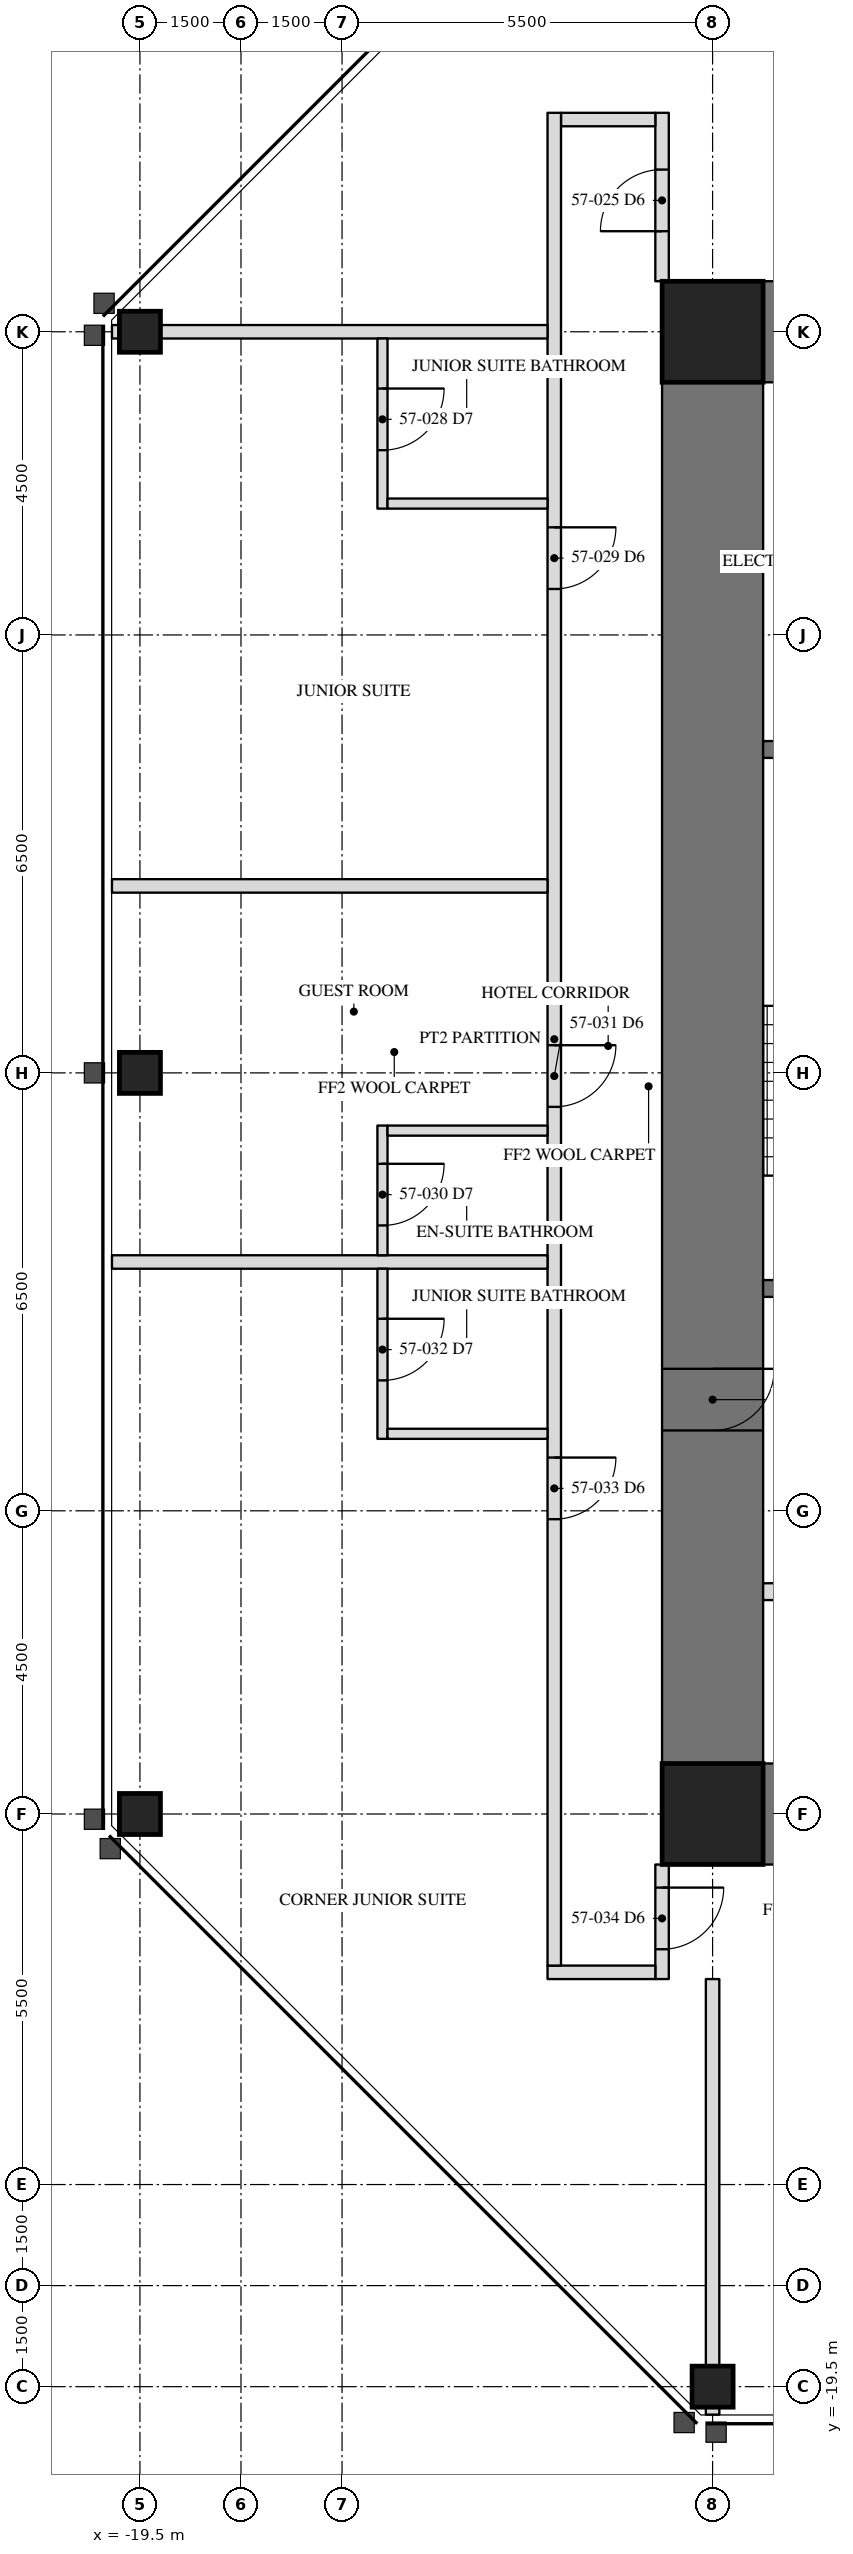
"""IFC4 building model, lengths in metres.
Left out: names, types, materials, properties, quantities, classifications, styles, units other than length and angle.
Written with IfcOpenShell. Run it as: python <this file> out.ifc"""

import sys

from ifc_helpers import new_model, si_unit, direction, frame, frame_2d, origin, origin_2d, place, context, subcontext, project, spatial, rectangle, hollow_rectangle, extrude, element, fill, save


model = new_model("IFC4")
c1 = context("Model", 3, precision=1e-05, world=origin(), true_north=direction((0.0, 1.0)))
c2 = subcontext(c1, "Body", "Model", "MODEL_VIEW")
j1 = project(units=[si_unit("LENGTHUNIT", "METRE"), si_unit("PLANEANGLEUNIT", "RADIAN")], contexts=[c1])
p1 = place(None, origin())
s1 = spatial("IfcSite", under=j1, at=p1, CompositionType="ELEMENT")
p2 = place(p1, origin())
s2 = spatial("IfcBuilding", under=s1, at=p2, CompositionType="ELEMENT")
p3 = place(p2, frame((0.0, 0.0, 236.2)))
s3 = spatial("IfcBuildingStorey", under=s2, at=p3, CompositionType="ELEMENT", Elevation=236.2)
for number, where, z_axis, x_axis in (
    (1, (-19.5, 0.0, 0.0), (0.0, 0.0, 1.0), (0.0, 1.0, 0.0)),
    (2, (-19.5, -11.0, 0.0), (0.0, 0.0, 1.0), (0.0, 1.0, 0.0)),
    (3, (-11.0, -19.5, 0.0), (0.0, 0.0, 1.0), (1.0, 0.0, 0.0)),
    (4, (-19.5, 11.0, 0.0), (0.0, 0.0, 1.0), (0.0, 1.0, 0.0)),
):
    element("IfcColumn", number, at=place(p3, frame(where, z_axis=z_axis, x_axis=x_axis)), inside=s3, PredefinedType="COLUMN", context=c2, shape_type="SweptSolid", body=[
        extrude(hollow_rectangle(XDim=0.61, YDim=0.61, WallThickness=0.051, at=origin_2d()), origin(), (0.0, 0.0, 1.0), 3.5),
    ])
p4 = place(p3, frame((-11.0, 11.0, 0.0), z_axis=(0.0, 0.0, 1.0), x_axis=(0.0, -1.0, 0.0)))
e5 = element("IfcWall", 5, at=p4, inside=s3, PredefinedType="SHEAR", context=c2, shape_type="SweptSolid", body=[
    extrude(rectangle(XDim=22.0, YDim=1.5, at=frame_2d((11.0, 0.0))), origin(), (0.0, 0.0, 1.0), 3.5),
])
p5 = place(p4, frame((15.393, 0.0, 0.0)))
e6 = element("IfcOpeningElement", 6, at=p5, cuts=e5, PredefinedType="OPENING", context=c2, shape_type="SweptSolid", body=[
    extrude(rectangle(XDim=0.915, YDim=2.134, at=frame_2d((0.458, 1.067))), frame((0.0, 0.76, 0.0), z_axis=(0.0, -1.0, 0.0), x_axis=(1.0, 0.0, 0.0)), (0.0, 0.0, 1.0), 1.52),
])
for number, where, z_axis, x_axis in (
    (7, (-6.5, 11.0, 0.0), (0.0, 0.0, 1.0), (-1.0, 0.0, 0.0)),
    (8, (-11.0, -11.0, 0.0), (0.0, 0.0, 1.0), (1.0, 0.0, 0.0)),
):
    element("IfcWall", number, at=place(p3, frame(where, z_axis=z_axis, x_axis=x_axis)), inside=s3, PredefinedType="SHEAR", context=c2, shape_type="SweptSolid", body=[
        extrude(rectangle(XDim=4.5, YDim=1.5, at=frame_2d((2.25, 0.0))), origin(), (0.0, 0.0, 1.0), 3.5),
    ])
for number, where, z_axis, x_axis in (
    (9, (-11.0, 11.0, 0.0), (0.0, 0.0, 1.0), (1.0, 0.0, 0.0)),
    (10, (-11.0, -11.0, 0.0), (0.0, 0.0, 1.0), (1.0, 0.0, 0.0)),
):
    element("IfcColumn", number, at=place(p3, frame(where, z_axis=z_axis, x_axis=x_axis)), inside=s3, PredefinedType="COLUMN", context=c2, shape_type="SweptSolid", body=[
        extrude(hollow_rectangle(XDim=1.499, YDim=1.499, WallThickness=0.102, at=origin_2d()), origin(), (0.0, 0.0, 1.0), 3.5),
    ])
p6 = place(p3, frame((-6.95, 4.8, 0.0), z_axis=(0.0, 0.0, 1.0), x_axis=(-1.0, 0.0, 0.0)))
e11 = element("IfcWall", 11, at=p6, inside=s3, PredefinedType="SOLIDWALL", context=c2, shape_type="SweptSolid", body=[
    extrude(rectangle(XDim=3.3, YDim=0.25, at=frame_2d((1.65, 0.0))), origin(), (0.0, 0.0, 1.0), 3.31),
])
p7 = place(p3, frame((-6.95, -3.2, 0.0), z_axis=(0.0, 0.0, 1.0), x_axis=(-1.0, 0.0, 0.0)))
e12 = element("IfcWall", 12, at=p7, inside=s3, PredefinedType="SOLIDWALL", context=c2, shape_type="SweptSolid", body=[
    extrude(rectangle(XDim=3.3, YDim=0.25, at=frame_2d((1.65, 0.0))), origin(), (0.0, 0.0, 1.0), 3.31),
])
p8 = place(p7, frame((1.116, 0.0, 0.0)))
e13 = element("IfcOpeningElement", 13, at=p8, cuts=e12, PredefinedType="OPENING", context=c2, shape_type="SweptSolid", body=[
    extrude(rectangle(XDim=1.067, YDim=2.134, at=frame_2d((0.533, 1.067))), frame((0.0, 0.135, 0.0), z_axis=(0.0, -1.0, 0.0), x_axis=(1.0, 0.0, 0.0)), (0.0, 0.0, 1.0), 0.27),
])
p9 = place(p3, frame((-6.95, -7.7, 0.0), z_axis=(0.0, 0.0, 1.0), x_axis=(-1.0, 0.0, 0.0)))
e14 = element("IfcWall", 14, at=p9, inside=s3, PredefinedType="PARTITIONING", context=c2, shape_type="SweptSolid", body=[
    extrude(rectangle(XDim=3.3, YDim=0.25, at=frame_2d((1.65, 0.0))), origin(), (0.0, 0.0, 1.0), 3.31),
])
p10 = place(p9, frame((0.45, 0.0, 0.0)))
e15 = element("IfcOpeningElement", 15, at=p10, cuts=e14, PredefinedType="OPENING", context=c2, shape_type="SweptSolid", body=[
    extrude(rectangle(XDim=1.219, YDim=2.134, at=frame_2d((0.609, 1.067))), frame((0.0, 0.135, 0.0), z_axis=(0.0, -1.0, 0.0), x_axis=(1.0, 0.0, 0.0)), (0.0, 0.0, 1.0), 0.27),
])
p11 = place(p3, frame((-11.75, 11.75, 0.0), z_axis=(0.0, 0.0, 1.0), x_axis=(0.0, 1.0, 0.0)))
e16 = element("IfcWall", 16, at=p11, inside=s3, PredefinedType="PARTITIONING", context=c2, shape_type="SweptSolid", body=[
    extrude(rectangle(XDim=2.5, YDim=0.2, at=frame_2d((1.25, 0.0))), origin(), (0.0, 0.0, 1.0), 3.31),
])
p12 = place(p11, frame((0.742, 0.0, 0.0)))
e17 = element("IfcOpeningElement", 17, at=p12, cuts=e16, PredefinedType="OPENING", context=c2, shape_type="SweptSolid", body=[
    extrude(rectangle(XDim=0.915, YDim=2.134, at=frame_2d((0.458, 1.067))), frame((0.0, 0.11, 0.0), z_axis=(0.0, -1.0, 0.0), x_axis=(1.0, 0.0, 0.0)), (0.0, 0.0, 1.0), 0.22),
])
p13 = place(p3, frame((-11.85, 14.15, 0.0), z_axis=(0.0, 0.0, 1.0), x_axis=(-1.0, 0.0, 0.0)))
e18 = element("IfcWall", 18, at=p13, inside=s3, PredefinedType="PARTITIONING", context=c2, shape_type="SweptSolid", body=[
    extrude(rectangle(XDim=1.4, YDim=0.2, at=frame_2d((0.7, 0.0))), origin(), (0.0, 0.0, 1.0), 3.31),
])
p14 = place(p3, frame((-11.75, -11.75, 0.0), z_axis=(0.0, 0.0, 1.0), x_axis=(0.0, -1.0, 0.0)))
e19 = element("IfcWall", 19, at=p14, inside=s3, PredefinedType="PARTITIONING", context=c2, shape_type="SweptSolid", body=[
    extrude(rectangle(XDim=1.7, YDim=0.2, at=frame_2d((0.85, 0.0))), origin(), (0.0, 0.0, 1.0), 3.31),
])
p15 = place(p14, frame((0.343, 0.0, 0.0)))
e20 = element("IfcOpeningElement", 20, at=p15, cuts=e19, PredefinedType="OPENING", context=c2, shape_type="SweptSolid", body=[
    extrude(rectangle(XDim=0.915, YDim=2.134, at=frame_2d((0.458, 1.067))), frame((0.0, 0.11, 0.0), z_axis=(0.0, -1.0, 0.0), x_axis=(1.0, 0.0, 0.0)), (0.0, 0.0, 1.0), 0.22),
])
p16 = place(p3, frame((-13.45, -13.35, 0.0), z_axis=(0.0, 0.0, 1.0), x_axis=(1.0, 0.0, 0.0)))
e21 = element("IfcWall", 21, at=p16, inside=s3, PredefinedType="PARTITIONING", context=c2, shape_type="SweptSolid", body=[
    extrude(rectangle(XDim=1.6, YDim=0.2, at=frame_2d((0.8, 0.0))), origin(), (0.0, 0.0, 1.0), 3.31),
])
p17 = place(p3, frame((-13.35, 14.25, 0.0), z_axis=(0.0, 0.0, 1.0), x_axis=(0.0, -1.0, 0.0)))
e22 = element("IfcWall", 22, at=p17, inside=s3, PredefinedType="PARTITIONING", context=c2, shape_type="SweptSolid", body=[
    extrude(rectangle(XDim=27.5, YDim=0.2, at=frame_2d((13.75, 0.0))), origin(), (0.0, 0.0, 1.0), 3.31),
])
p18 = place(p17, frame((6.153, 0.0, 0.0)))
e23 = element("IfcOpeningElement", 23, at=p18, cuts=e22, PredefinedType="OPENING", context=c2, shape_type="SweptSolid", body=[
    extrude(rectangle(XDim=0.915, YDim=2.134, at=frame_2d((0.458, 1.067))), frame((0.0, 0.11, 0.0), z_axis=(0.0, -1.0, 0.0), x_axis=(1.0, 0.0, 0.0)), (0.0, 0.0, 1.0), 0.22),
])
p19 = place(p17, frame((13.84, 0.0, 0.0)))
e24 = element("IfcOpeningElement", 24, at=p19, cuts=e22, PredefinedType="OPENING", context=c2, shape_type="SweptSolid", body=[
    extrude(rectangle(XDim=0.915, YDim=2.134, at=frame_2d((0.458, 1.067))), frame((0.0, 0.11, 0.0), z_axis=(0.0, -1.0, 0.0), x_axis=(1.0, 0.0, 0.0)), (0.0, 0.0, 1.0), 0.22),
])
p20 = place(p17, frame((19.959, 0.0, 0.0)))
e25 = element("IfcOpeningElement", 25, at=p20, cuts=e22, PredefinedType="OPENING", context=c2, shape_type="SweptSolid", body=[
    extrude(rectangle(XDim=0.915, YDim=2.134, at=frame_2d((0.458, 1.067))), frame((0.0, 0.11, 0.0), z_axis=(0.0, -1.0, 0.0), x_axis=(1.0, 0.0, 0.0)), (0.0, 0.0, 1.0), 0.22),
])
p21 = place(p3, frame((-13.45, 11.0, 0.0), z_axis=(0.0, 0.0, 1.0), x_axis=(-1.0, 0.0, 0.0)))
e26 = element("IfcWall", 26, at=p21, inside=s3, PredefinedType="PARTITIONING", context=c2, shape_type="SweptSolid", body=[
    extrude(rectangle(XDim=6.465, YDim=0.2, at=frame_2d((3.232, 0.0))), origin(), (0.0, 0.0, 1.0), 2.802),
])
for number, where, z_axis, x_axis in (
    (27, (-13.45, 2.775, 0.0), (0.0, 0.0, 1.0), (-1.0, 0.0, 0.0)),
    (28, (-13.45, -2.807, 0.0), (0.0, 0.0, 1.0), (-1.0, 0.0, 0.0)),
):
    element("IfcWall", number, at=place(p3, frame(where, z_axis=z_axis, x_axis=x_axis)), inside=s3, PredefinedType="PARTITIONING", context=c2, shape_type="SweptSolid", body=[
        extrude(rectangle(XDim=6.465, YDim=0.2, at=frame_2d((3.232, 0.0))), origin(), (0.0, 0.0, 1.0), 3.31),
    ])
p22 = place(p3, frame((-15.9, 10.9, 0.0), z_axis=(0.0, 0.0, 1.0), x_axis=(0.0, -1.0, 0.0)))
e29 = element("IfcWall", 29, at=p22, inside=s3, PredefinedType="PARTITIONING", context=c2, shape_type="SweptSolid", body=[
    extrude(rectangle(XDim=2.525, YDim=0.15, at=frame_2d((1.262, 0.0))), origin(), (0.0, 0.0, 1.0), 3.31),
])
p23 = place(p22, frame((0.742, 0.0, 0.0)))
e30 = element("IfcOpeningElement", 30, at=p23, cuts=e29, PredefinedType="OPENING", context=c2, shape_type="SweptSolid", body=[
    extrude(rectangle(XDim=0.915, YDim=2.032, at=frame_2d((0.458, 1.016))), frame((0.0, 0.085, 0.0), z_axis=(0.0, -1.0, 0.0), x_axis=(1.0, 0.0, 0.0)), (0.0, 0.0, 1.0), 0.17),
])
p24 = place(p3, frame((-13.45, 8.45, 0.0), z_axis=(0.0, 0.0, 1.0), x_axis=(-1.0, 0.0, 0.0)))
e31 = element("IfcWall", 31, at=p24, inside=s3, PredefinedType="PARTITIONING", context=c2, shape_type="SweptSolid", body=[
    extrude(rectangle(XDim=2.375, YDim=0.15, at=frame_2d((1.188, 0.0))), origin(), (0.0, 0.0, 1.0), 3.31),
])
p25 = place(p3, frame((-15.9, -0.782, 0.0), z_axis=(0.0, 0.0, 1.0), x_axis=(0.0, -1.0, 0.0)))
e32 = element("IfcWall", 32, at=p25, inside=s3, PredefinedType="PARTITIONING", context=c2, shape_type="SweptSolid", body=[
    extrude(rectangle(XDim=1.925, YDim=0.15, at=frame_2d((0.962, 0.0))), origin(), (0.0, 0.0, 1.0), 3.31),
])
p26 = place(p25, frame((0.567, 0.0, 0.0)))
e33 = element("IfcOpeningElement", 33, at=p26, cuts=e32, PredefinedType="OPENING", context=c2, shape_type="SweptSolid", body=[
    extrude(rectangle(XDim=0.915, YDim=2.032, at=frame_2d((0.458, 1.016))), frame((0.0, 0.085, 0.0), z_axis=(0.0, -1.0, 0.0), x_axis=(1.0, 0.0, 0.0)), (0.0, 0.0, 1.0), 0.17),
])
p27 = place(p3, frame((-13.45, -0.857, 0.0), z_axis=(0.0, 0.0, 1.0), x_axis=(-1.0, 0.0, 0.0)))
e34 = element("IfcWall", 34, at=p27, inside=s3, PredefinedType="PARTITIONING", context=c2, shape_type="SweptSolid", body=[
    extrude(rectangle(XDim=2.375, YDim=0.15, at=frame_2d((1.188, 0.0))), origin(), (0.0, 0.0, 1.0), 3.31),
])
p28 = place(p3, frame((-15.9, -2.907, 0.0), z_axis=(0.0, 0.0, 1.0), x_axis=(0.0, -1.0, 0.0)))
e35 = element("IfcWall", 35, at=p28, inside=s3, PredefinedType="PARTITIONING", context=c2, shape_type="SweptSolid", body=[
    extrude(rectangle(XDim=2.525, YDim=0.15, at=frame_2d((1.262, 0.0))), origin(), (0.0, 0.0, 1.0), 3.31),
])
p29 = place(p28, frame((0.742, 0.0, 0.0)))
e36 = element("IfcOpeningElement", 36, at=p29, cuts=e35, PredefinedType="OPENING", context=c2, shape_type="SweptSolid", body=[
    extrude(rectangle(XDim=0.915, YDim=2.032, at=frame_2d((0.458, 1.016))), frame((0.0, 0.085, 0.0), z_axis=(0.0, -1.0, 0.0), x_axis=(1.0, 0.0, 0.0)), (0.0, 0.0, 1.0), 0.17),
])
p30 = place(p3, frame((-13.45, -5.357, 0.0), z_axis=(0.0, 0.0, 1.0), x_axis=(-1.0, 0.0, 0.0)))
e37 = element("IfcWall", 37, at=p30, inside=s3, PredefinedType="PARTITIONING", context=c2, shape_type="SweptSolid", body=[
    extrude(rectangle(XDim=2.375, YDim=0.15, at=frame_2d((1.188, 0.0))), origin(), (0.0, 0.0, 1.0), 3.31),
])
p31 = place(p3, frame((-11.0, -13.45, 0.0), z_axis=(0.0, 0.0, 1.0), x_axis=(0.0, -1.0, 0.0)))
e38 = element("IfcWall", 38, at=p31, inside=s3, PredefinedType="PARTITIONING", context=c2, shape_type="SweptSolid", body=[
    extrude(rectangle(XDim=6.465, YDim=0.2, at=frame_2d((3.232, 0.0))), origin(), (0.0, 0.0, 1.0), 2.802),
])
p32 = place(p5, origin())
e39 = element("IfcDoor", 39, at=p32, inside=s3, OperationType="SINGLE_SWING_RIGHT", PredefinedType="DOOR", context=c2, shape_type="SweptSolid", body=[
    extrude(rectangle(XDim=0.915, YDim=2.134, at=frame_2d((0.458, 1.067))), frame((0.0, -0.675, 0.0), z_axis=(0.0, -1.0, 0.0), x_axis=(1.0, 0.0, 0.0)), (0.0, 0.0, 1.0), 0.05),
])
fill(e6, e39)
p33 = place(p12, origin())
e40 = element("IfcDoor", 40, at=p33, inside=s3, OperationType="SINGLE_SWING_LEFT", PredefinedType="DOOR", context=c2, shape_type="SweptSolid", body=[
    extrude(rectangle(XDim=0.915, YDim=2.134, at=frame_2d((0.458, 1.067))), frame((0.0, 0.025, 0.0), z_axis=(0.0, -1.0, 0.0), x_axis=(1.0, 0.0, 0.0)), (0.0, 0.0, 1.0), 0.05),
])
fill(e17, e40)
p34 = place(p23, origin())
e41 = element("IfcDoor", 41, at=p34, inside=s3, OperationType="SINGLE_SWING_LEFT", PredefinedType="DOOR", context=c2, shape_type="SweptSolid", body=[
    extrude(rectangle(XDim=0.915, YDim=2.032, at=frame_2d((0.458, 1.016))), frame((0.0, 0.025, 0.0), z_axis=(0.0, -1.0, 0.0), x_axis=(1.0, 0.0, 0.0)), (0.0, 0.0, 1.0), 0.05),
])
fill(e30, e41)
p35 = place(p18, origin())
e42 = element("IfcDoor", 42, at=p35, inside=s3, OperationType="SINGLE_SWING_LEFT", PredefinedType="DOOR", context=c2, shape_type="SweptSolid", body=[
    extrude(rectangle(XDim=0.915, YDim=2.134, at=frame_2d((0.458, 1.067))), frame((0.0, 0.025, 0.0), z_axis=(0.0, -1.0, 0.0), x_axis=(1.0, 0.0, 0.0)), (0.0, 0.0, 1.0), 0.05),
])
fill(e23, e42)
p36 = place(p26, origin())
e43 = element("IfcDoor", 43, at=p36, inside=s3, OperationType="SINGLE_SWING_LEFT", PredefinedType="DOOR", context=c2, shape_type="SweptSolid", body=[
    extrude(rectangle(XDim=0.915, YDim=2.032, at=frame_2d((0.458, 1.016))), frame((0.0, 0.025, 0.0), z_axis=(0.0, -1.0, 0.0), x_axis=(1.0, 0.0, 0.0)), (0.0, 0.0, 1.0), 0.05),
])
fill(e33, e43)
p37 = place(p19, origin())
e44 = element("IfcDoor", 44, at=p37, inside=s3, OperationType="SINGLE_SWING_LEFT", PredefinedType="DOOR", context=c2, shape_type="SweptSolid", body=[
    extrude(rectangle(XDim=0.915, YDim=2.134, at=frame_2d((0.458, 1.067))), frame((0.0, 0.025, 0.0), z_axis=(0.0, -1.0, 0.0), x_axis=(1.0, 0.0, 0.0)), (0.0, 0.0, 1.0), 0.05),
])
fill(e24, e44)
p38 = place(p29, origin())
e45 = element("IfcDoor", 45, at=p38, inside=s3, OperationType="SINGLE_SWING_LEFT", PredefinedType="DOOR", context=c2, shape_type="SweptSolid", body=[
    extrude(rectangle(XDim=0.915, YDim=2.032, at=frame_2d((0.458, 1.016))), frame((0.0, 0.025, 0.0), z_axis=(0.0, -1.0, 0.0), x_axis=(1.0, 0.0, 0.0)), (0.0, 0.0, 1.0), 0.05),
])
fill(e36, e45)
p39 = place(p20, origin())
e46 = element("IfcDoor", 46, at=p39, inside=s3, OperationType="SINGLE_SWING_LEFT", PredefinedType="DOOR", context=c2, shape_type="SweptSolid", body=[
    extrude(rectangle(XDim=0.915, YDim=2.134, at=frame_2d((0.458, 1.067))), frame((0.0, 0.025, 0.0), z_axis=(0.0, -1.0, 0.0), x_axis=(1.0, 0.0, 0.0)), (0.0, 0.0, 1.0), 0.05),
])
fill(e25, e46)
p40 = place(p15, origin())
e47 = element("IfcDoor", 47, at=p40, inside=s3, OperationType="SINGLE_SWING_LEFT", PredefinedType="DOOR", context=c2, shape_type="SweptSolid", body=[
    extrude(rectangle(XDim=0.915, YDim=2.134, at=frame_2d((0.458, 1.067))), frame((0.0, 0.025, 0.0), z_axis=(0.0, -1.0, 0.0), x_axis=(1.0, 0.0, 0.0)), (0.0, 0.0, 1.0), 0.05),
])
fill(e20, e47)
save(model, sys.argv[1])
